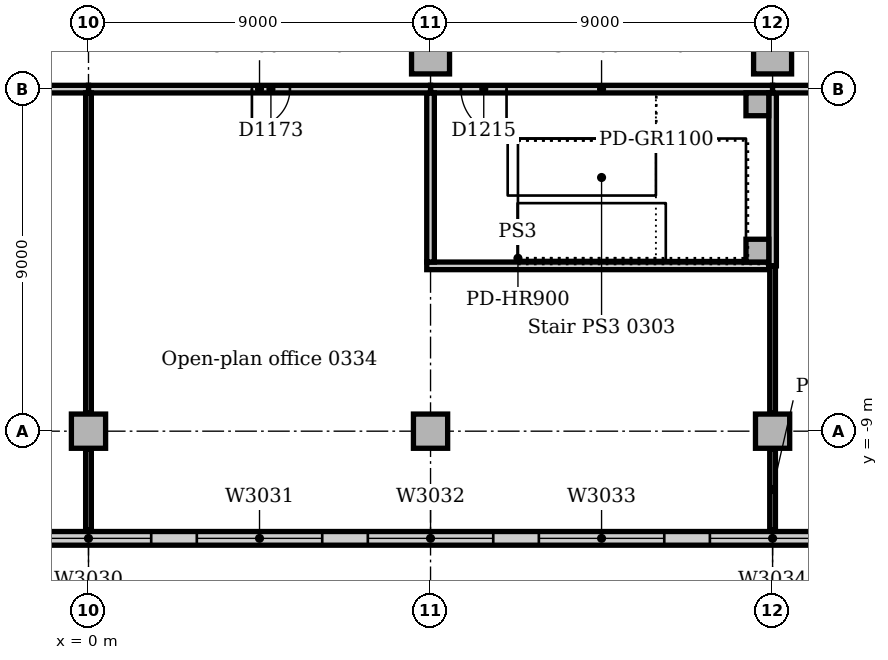
"""IFC4 building model, lengths in metres.
Left out: names, types, materials, properties, quantities, classifications, styles, units other than length and angle.
Written with IfcOpenShell. Run it as: python <this file> out.ifc"""

import sys

from ifc_helpers import new_model, si_unit, direction, frame, frame_2d, origin, origin_with_axes, origin_2d, place, context, subcontext, project, spatial, rectangle, extrude, element, fill, save


model = new_model("IFC4")
c1 = context("Model", 3, precision=1e-05, world=origin(), true_north=direction((0.0, 1.0)))
c2 = subcontext(c1, "Body", "Model", "MODEL_VIEW")
j1 = project(units=[si_unit("LENGTHUNIT", "METRE"), si_unit("PLANEANGLEUNIT", "RADIAN")], contexts=[c1])
p1 = place(None, origin())
s1 = spatial("IfcSite", under=j1, at=p1, CompositionType="ELEMENT")
p2 = place(p1, origin())
s2 = spatial("IfcBuilding", under=s1, at=p2, CompositionType="ELEMENT")
p3 = place(p2, frame((0.0, 0.0, 16.0)))
s3 = spatial("IfcBuildingStorey", under=s2, at=p3, CompositionType="ELEMENT", Elevation=16.0)
p4 = place(p3, frame((3.602, 1.453, 0.0), z_axis=(0.0, 0.0, 1.0), x_axis=(1.0, 0.0, 0.0)))
e1 = element("IfcColumn", 1, at=p4, inside=s3, PredefinedType="COLUMN", context=c2, shape_type="SweptSolid", body=[
    extrude(rectangle(XDim=1.2, YDim=1.2, at=origin_2d()), origin(), (0.0, 0.0, 1.0), 4.7),
])
for number, where, z_axis, x_axis in (
    (2, (9.0, 0.9, 0.0), (0.0, 0.0, 1.0), (1.0, 0.0, 0.0)),
    (3, (18.0, 0.9, 0.0), (0.0, 0.0, 1.0), (1.0, 0.0, 0.0)),
):
    element("IfcColumn", number, at=place(p3, frame(where, z_axis=z_axis, x_axis=x_axis)), inside=s3, PredefinedType="COLUMN", context=c2, shape_type="SweptSolid", body=[
        extrude(rectangle(XDim=1.0, YDim=1.0, at=origin_2d()), origin(), (0.0, 0.0, 1.0), 4.7),
    ])
for number, where, z_axis, x_axis in (
    (4, (0.0, -9.0, 0.0), (0.0, 0.0, 1.0), (1.0, 0.0, 0.0)),
    (5, (9.0, -9.0, 0.0), (0.0, 0.0, 1.0), (1.0, 0.0, 0.0)),
    (6, (18.0, -9.0, 0.0), (0.0, 0.0, 1.0), (1.0, 0.0, 0.0)),
):
    element("IfcColumn", number, at=place(p3, frame(where, z_axis=z_axis, x_axis=x_axis)), inside=s3, PredefinedType="COLUMN", context=c2, shape_type="SweptSolid", body=[
        extrude(rectangle(XDim=0.9, YDim=0.9, at=origin_2d()), origin(), (0.0, 0.0, 1.0), 4.7),
    ])
p5 = place(p3, frame((-81.0, -11.82, 0.0), z_axis=(0.0, 0.0, 1.0), x_axis=(1.0, 0.0, 0.0)))
e7 = element("IfcWall", 7, at=p5, inside=s3, PredefinedType="STANDARD", context=c2, shape_type="SweptSolid", body=[
    extrude(rectangle(XDim=144.0, YDim=0.36, at=frame_2d((72.0, 0.0))), origin(), (0.0, 0.0, 1.0), 4.7),
])
p6 = place(p5, frame((2.85, 0.0, 0.9)))
e8 = element("IfcOpeningElement", 8, at=p6, cuts=e7, PredefinedType="OPENING", context=c2, shape_type="SweptSolid", body=[
    extrude(rectangle(XDim=3.3, YDim=2.4, at=frame_2d((1.65, 1.2))), frame((0.0, 0.19, 0.0), z_axis=(0.0, -1.0, 0.0), x_axis=(1.0, 0.0, 0.0)), (0.0, 0.0, 1.0), 0.38),
])
p7 = place(p5, frame((7.35, 0.0, 0.9)))
e9 = element("IfcOpeningElement", 9, at=p7, cuts=e7, PredefinedType="OPENING", context=c2, shape_type="SweptSolid", body=[
    extrude(rectangle(XDim=3.3, YDim=2.4, at=frame_2d((1.65, 1.2))), frame((0.0, 0.19, 0.0), z_axis=(0.0, -1.0, 0.0), x_axis=(1.0, 0.0, 0.0)), (0.0, 0.0, 1.0), 0.38),
])
p8 = place(p5, frame((11.85, 0.0, 0.9)))
e10 = element("IfcOpeningElement", 10, at=p8, cuts=e7, PredefinedType="OPENING", context=c2, shape_type="SweptSolid", body=[
    extrude(rectangle(XDim=3.3, YDim=2.4, at=frame_2d((1.65, 1.2))), frame((0.0, 0.19, 0.0), z_axis=(0.0, -1.0, 0.0), x_axis=(1.0, 0.0, 0.0)), (0.0, 0.0, 1.0), 0.38),
])
p9 = place(p5, frame((16.35, 0.0, 0.9)))
e11 = element("IfcOpeningElement", 11, at=p9, cuts=e7, PredefinedType="OPENING", context=c2, shape_type="SweptSolid", body=[
    extrude(rectangle(XDim=3.3, YDim=2.4, at=frame_2d((1.65, 1.2))), frame((0.0, 0.19, 0.0), z_axis=(0.0, -1.0, 0.0), x_axis=(1.0, 0.0, 0.0)), (0.0, 0.0, 1.0), 0.38),
])
p10 = place(p5, frame((20.85, 0.0, 0.9)))
e12 = element("IfcOpeningElement", 12, at=p10, cuts=e7, PredefinedType="OPENING", context=c2, shape_type="SweptSolid", body=[
    extrude(rectangle(XDim=3.3, YDim=2.4, at=frame_2d((1.65, 1.2))), frame((0.0, 0.19, 0.0), z_axis=(0.0, -1.0, 0.0), x_axis=(1.0, 0.0, 0.0)), (0.0, 0.0, 1.0), 0.38),
])
p11 = place(p5, frame((25.35, 0.0, 0.9)))
e13 = element("IfcOpeningElement", 13, at=p11, cuts=e7, PredefinedType="OPENING", context=c2, shape_type="SweptSolid", body=[
    extrude(rectangle(XDim=3.3, YDim=2.4, at=frame_2d((1.65, 1.2))), frame((0.0, 0.19, 0.0), z_axis=(0.0, -1.0, 0.0), x_axis=(1.0, 0.0, 0.0)), (0.0, 0.0, 1.0), 0.38),
])
p12 = place(p5, frame((29.85, 0.0, 0.9)))
e14 = element("IfcOpeningElement", 14, at=p12, cuts=e7, PredefinedType="OPENING", context=c2, shape_type="SweptSolid", body=[
    extrude(rectangle(XDim=3.3, YDim=2.4, at=frame_2d((1.65, 1.2))), frame((0.0, 0.19, 0.0), z_axis=(0.0, -1.0, 0.0), x_axis=(1.0, 0.0, 0.0)), (0.0, 0.0, 1.0), 0.38),
])
p13 = place(p5, frame((34.35, 0.0, 0.9)))
e15 = element("IfcOpeningElement", 15, at=p13, cuts=e7, PredefinedType="OPENING", context=c2, shape_type="SweptSolid", body=[
    extrude(rectangle(XDim=3.3, YDim=2.4, at=frame_2d((1.65, 1.2))), frame((0.0, 0.19, 0.0), z_axis=(0.0, -1.0, 0.0), x_axis=(1.0, 0.0, 0.0)), (0.0, 0.0, 1.0), 0.38),
])
p14 = place(p5, frame((38.85, 0.0, 0.9)))
e16 = element("IfcOpeningElement", 16, at=p14, cuts=e7, PredefinedType="OPENING", context=c2, shape_type="SweptSolid", body=[
    extrude(rectangle(XDim=3.3, YDim=2.4, at=frame_2d((1.65, 1.2))), frame((0.0, 0.19, 0.0), z_axis=(0.0, -1.0, 0.0), x_axis=(1.0, 0.0, 0.0)), (0.0, 0.0, 1.0), 0.38),
])
p15 = place(p5, frame((43.35, 0.0, 0.9)))
e17 = element("IfcOpeningElement", 17, at=p15, cuts=e7, PredefinedType="OPENING", context=c2, shape_type="SweptSolid", body=[
    extrude(rectangle(XDim=3.3, YDim=2.4, at=frame_2d((1.65, 1.2))), frame((0.0, 0.19, 0.0), z_axis=(0.0, -1.0, 0.0), x_axis=(1.0, 0.0, 0.0)), (0.0, 0.0, 1.0), 0.38),
])
p16 = place(p5, frame((47.85, 0.0, 0.9)))
e18 = element("IfcOpeningElement", 18, at=p16, cuts=e7, PredefinedType="OPENING", context=c2, shape_type="SweptSolid", body=[
    extrude(rectangle(XDim=3.3, YDim=2.4, at=frame_2d((1.65, 1.2))), frame((0.0, 0.19, 0.0), z_axis=(0.0, -1.0, 0.0), x_axis=(1.0, 0.0, 0.0)), (0.0, 0.0, 1.0), 0.38),
])
p17 = place(p5, frame((52.35, 0.0, 0.9)))
e19 = element("IfcOpeningElement", 19, at=p17, cuts=e7, PredefinedType="OPENING", context=c2, shape_type="SweptSolid", body=[
    extrude(rectangle(XDim=3.3, YDim=2.4, at=frame_2d((1.65, 1.2))), frame((0.0, 0.19, 0.0), z_axis=(0.0, -1.0, 0.0), x_axis=(1.0, 0.0, 0.0)), (0.0, 0.0, 1.0), 0.38),
])
p18 = place(p5, frame((56.85, 0.0, 0.9)))
e20 = element("IfcOpeningElement", 20, at=p18, cuts=e7, PredefinedType="OPENING", context=c2, shape_type="SweptSolid", body=[
    extrude(rectangle(XDim=3.3, YDim=2.4, at=frame_2d((1.65, 1.2))), frame((0.0, 0.19, 0.0), z_axis=(0.0, -1.0, 0.0), x_axis=(1.0, 0.0, 0.0)), (0.0, 0.0, 1.0), 0.38),
])
p19 = place(p5, frame((61.35, 0.0, 0.9)))
e21 = element("IfcOpeningElement", 21, at=p19, cuts=e7, PredefinedType="OPENING", context=c2, shape_type="SweptSolid", body=[
    extrude(rectangle(XDim=3.3, YDim=2.4, at=frame_2d((1.65, 1.2))), frame((0.0, 0.19, 0.0), z_axis=(0.0, -1.0, 0.0), x_axis=(1.0, 0.0, 0.0)), (0.0, 0.0, 1.0), 0.38),
])
p20 = place(p5, frame((65.85, 0.0, 0.9)))
e22 = element("IfcOpeningElement", 22, at=p20, cuts=e7, PredefinedType="OPENING", context=c2, shape_type="SweptSolid", body=[
    extrude(rectangle(XDim=3.3, YDim=2.4, at=frame_2d((1.65, 1.2))), frame((0.0, 0.19, 0.0), z_axis=(0.0, -1.0, 0.0), x_axis=(1.0, 0.0, 0.0)), (0.0, 0.0, 1.0), 0.38),
])
p21 = place(p5, frame((70.35, 0.0, 0.9)))
e23 = element("IfcOpeningElement", 23, at=p21, cuts=e7, PredefinedType="OPENING", context=c2, shape_type="SweptSolid", body=[
    extrude(rectangle(XDim=3.3, YDim=2.4, at=frame_2d((1.65, 1.2))), frame((0.0, 0.19, 0.0), z_axis=(0.0, -1.0, 0.0), x_axis=(1.0, 0.0, 0.0)), (0.0, 0.0, 1.0), 0.38),
])
p22 = place(p5, frame((74.85, 0.0, 0.9)))
e24 = element("IfcOpeningElement", 24, at=p22, cuts=e7, PredefinedType="OPENING", context=c2, shape_type="SweptSolid", body=[
    extrude(rectangle(XDim=3.3, YDim=2.4, at=frame_2d((1.65, 1.2))), frame((0.0, 0.19, 0.0), z_axis=(0.0, -1.0, 0.0), x_axis=(1.0, 0.0, 0.0)), (0.0, 0.0, 1.0), 0.38),
])
p23 = place(p5, frame((79.35, 0.0, 0.9)))
e25 = element("IfcOpeningElement", 25, at=p23, cuts=e7, PredefinedType="OPENING", context=c2, shape_type="SweptSolid", body=[
    extrude(rectangle(XDim=3.3, YDim=2.4, at=frame_2d((1.65, 1.2))), frame((0.0, 0.19, 0.0), z_axis=(0.0, -1.0, 0.0), x_axis=(1.0, 0.0, 0.0)), (0.0, 0.0, 1.0), 0.38),
])
p24 = place(p5, frame((83.85, 0.0, 0.9)))
e26 = element("IfcOpeningElement", 26, at=p24, cuts=e7, PredefinedType="OPENING", context=c2, shape_type="SweptSolid", body=[
    extrude(rectangle(XDim=3.3, YDim=2.4, at=frame_2d((1.65, 1.2))), frame((0.0, 0.19, 0.0), z_axis=(0.0, -1.0, 0.0), x_axis=(1.0, 0.0, 0.0)), (0.0, 0.0, 1.0), 0.38),
])
p25 = place(p5, frame((88.35, 0.0, 0.9)))
e27 = element("IfcOpeningElement", 27, at=p25, cuts=e7, PredefinedType="OPENING", context=c2, shape_type="SweptSolid", body=[
    extrude(rectangle(XDim=3.3, YDim=2.4, at=frame_2d((1.65, 1.2))), frame((0.0, 0.19, 0.0), z_axis=(0.0, -1.0, 0.0), x_axis=(1.0, 0.0, 0.0)), (0.0, 0.0, 1.0), 0.38),
])
p26 = place(p5, frame((92.85, 0.0, 0.9)))
e28 = element("IfcOpeningElement", 28, at=p26, cuts=e7, PredefinedType="OPENING", context=c2, shape_type="SweptSolid", body=[
    extrude(rectangle(XDim=3.3, YDim=2.4, at=frame_2d((1.65, 1.2))), frame((0.0, 0.19, 0.0), z_axis=(0.0, -1.0, 0.0), x_axis=(1.0, 0.0, 0.0)), (0.0, 0.0, 1.0), 0.38),
])
p27 = place(p5, frame((97.35, 0.0, 0.9)))
e29 = element("IfcOpeningElement", 29, at=p27, cuts=e7, PredefinedType="OPENING", context=c2, shape_type="SweptSolid", body=[
    extrude(rectangle(XDim=3.3, YDim=2.4, at=frame_2d((1.65, 1.2))), frame((0.0, 0.19, 0.0), z_axis=(0.0, -1.0, 0.0), x_axis=(1.0, 0.0, 0.0)), (0.0, 0.0, 1.0), 0.38),
])
p28 = place(p5, frame((101.85, 0.0, 0.9)))
e30 = element("IfcOpeningElement", 30, at=p28, cuts=e7, PredefinedType="OPENING", context=c2, shape_type="SweptSolid", body=[
    extrude(rectangle(XDim=3.3, YDim=2.4, at=frame_2d((1.65, 1.2))), frame((0.0, 0.19, 0.0), z_axis=(0.0, -1.0, 0.0), x_axis=(1.0, 0.0, 0.0)), (0.0, 0.0, 1.0), 0.38),
])
p29 = place(p5, frame((106.35, 0.0, 0.9)))
e31 = element("IfcOpeningElement", 31, at=p29, cuts=e7, PredefinedType="OPENING", context=c2, shape_type="SweptSolid", body=[
    extrude(rectangle(XDim=3.3, YDim=2.4, at=frame_2d((1.65, 1.2))), frame((0.0, 0.19, 0.0), z_axis=(0.0, -1.0, 0.0), x_axis=(1.0, 0.0, 0.0)), (0.0, 0.0, 1.0), 0.38),
])
p30 = place(p5, frame((110.85, 0.0, 0.9)))
e32 = element("IfcOpeningElement", 32, at=p30, cuts=e7, PredefinedType="OPENING", context=c2, shape_type="SweptSolid", body=[
    extrude(rectangle(XDim=3.3, YDim=2.4, at=frame_2d((1.65, 1.2))), frame((0.0, 0.19, 0.0), z_axis=(0.0, -1.0, 0.0), x_axis=(1.0, 0.0, 0.0)), (0.0, 0.0, 1.0), 0.38),
])
p31 = place(p5, frame((115.35, 0.0, 0.9)))
e33 = element("IfcOpeningElement", 33, at=p31, cuts=e7, PredefinedType="OPENING", context=c2, shape_type="SweptSolid", body=[
    extrude(rectangle(XDim=3.3, YDim=2.4, at=frame_2d((1.65, 1.2))), frame((0.0, 0.19, 0.0), z_axis=(0.0, -1.0, 0.0), x_axis=(1.0, 0.0, 0.0)), (0.0, 0.0, 1.0), 0.38),
])
p32 = place(p5, frame((119.85, 0.0, 0.9)))
e34 = element("IfcOpeningElement", 34, at=p32, cuts=e7, PredefinedType="OPENING", context=c2, shape_type="SweptSolid", body=[
    extrude(rectangle(XDim=3.3, YDim=2.4, at=frame_2d((1.65, 1.2))), frame((0.0, 0.19, 0.0), z_axis=(0.0, -1.0, 0.0), x_axis=(1.0, 0.0, 0.0)), (0.0, 0.0, 1.0), 0.38),
])
p33 = place(p5, frame((124.35, 0.0, 0.9)))
e35 = element("IfcOpeningElement", 35, at=p33, cuts=e7, PredefinedType="OPENING", context=c2, shape_type="SweptSolid", body=[
    extrude(rectangle(XDim=3.3, YDim=2.4, at=frame_2d((1.65, 1.2))), frame((0.0, 0.19, 0.0), z_axis=(0.0, -1.0, 0.0), x_axis=(1.0, 0.0, 0.0)), (0.0, 0.0, 1.0), 0.38),
])
p34 = place(p5, frame((128.85, 0.0, 0.9)))
e36 = element("IfcOpeningElement", 36, at=p34, cuts=e7, PredefinedType="OPENING", context=c2, shape_type="SweptSolid", body=[
    extrude(rectangle(XDim=3.3, YDim=2.4, at=frame_2d((1.65, 1.2))), frame((0.0, 0.19, 0.0), z_axis=(0.0, -1.0, 0.0), x_axis=(1.0, 0.0, 0.0)), (0.0, 0.0, 1.0), 0.38),
])
p35 = place(p5, frame((133.35, 0.0, 0.9)))
e37 = element("IfcOpeningElement", 37, at=p35, cuts=e7, PredefinedType="OPENING", context=c2, shape_type="SweptSolid", body=[
    extrude(rectangle(XDim=3.3, YDim=2.4, at=frame_2d((1.65, 1.2))), frame((0.0, 0.19, 0.0), z_axis=(0.0, -1.0, 0.0), x_axis=(1.0, 0.0, 0.0)), (0.0, 0.0, 1.0), 0.38),
])
p36 = place(p5, frame((137.85, 0.0, 0.9)))
e38 = element("IfcOpeningElement", 38, at=p36, cuts=e7, PredefinedType="OPENING", context=c2, shape_type="SweptSolid", body=[
    extrude(rectangle(XDim=3.3, YDim=2.4, at=frame_2d((1.65, 1.2))), frame((0.0, 0.19, 0.0), z_axis=(0.0, -1.0, 0.0), x_axis=(1.0, 0.0, 0.0)), (0.0, 0.0, 1.0), 0.38),
])
for number, where, z_axis, x_axis in (
    (39, (17.6, -4.25, 0.0), (0.0, 0.0, 1.0), (1.0, 0.0, 0.0)),
    (40, (17.6, -0.4, 0.0), (0.0, 0.0, 1.0), (1.0, 0.0, 0.0)),
):
    element("IfcColumn", number, at=place(p3, frame(where, z_axis=z_axis, x_axis=x_axis)), inside=s3, PredefinedType="COLUMN", context=c2, shape_type="SweptSolid", body=[
        extrude(rectangle(XDim=0.6, YDim=0.6, at=origin_2d()), origin(), (0.0, 0.0, 1.0), 5.0),
    ])
p37 = place(p3, frame((9.0, 0.0, 0.0), z_axis=(0.0, 0.0, 1.0), x_axis=(1.0, 0.0, 0.0)))
e41 = element("IfcWall", 41, at=p37, inside=s3, PredefinedType="SOLIDWALL", context=c2, shape_type="SweptSolid", body=[
    extrude(rectangle(XDim=9.0, YDim=0.2, at=frame_2d((4.5, 0.0))), origin(), (0.0, 0.0, 1.0), 4.7),
])
p38 = place(p37, frame((0.8, 0.0, 0.0)))
e42 = element("IfcOpeningElement", 42, at=p38, cuts=e41, PredefinedType="OPENING", context=c2, shape_type="SweptSolid", body=[
    extrude(rectangle(XDim=1.2, YDim=2.1, at=frame_2d((0.6, 1.05))), frame((0.0, 0.11, 0.0), z_axis=(0.0, -1.0, 0.0), x_axis=(1.0, 0.0, 0.0)), (0.0, 0.0, 1.0), 0.22),
])
p39 = place(p3, frame((8.9, -4.65, 0.0), z_axis=(0.0, 0.0, 1.0), x_axis=(1.0, 0.0, 0.0)))
e43 = element("IfcWall", 43, at=p39, inside=s3, PredefinedType="SOLIDWALL", context=c2, shape_type="SweptSolid", body=[
    extrude(rectangle(XDim=9.0, YDim=0.2, at=frame_2d((4.5, 0.0))), origin(), (0.0, 0.0, 1.0), 4.7),
])
p40 = place(p3, frame((9.0, -4.55, 0.0), z_axis=(0.0, 0.0, 1.0), x_axis=(0.0, 1.0, 0.0)))
e44 = element("IfcWall", 44, at=p40, inside=s3, PredefinedType="SOLIDWALL", context=c2, shape_type="SweptSolid", body=[
    extrude(rectangle(XDim=4.45, YDim=0.2, at=frame_2d((2.225, 0.0))), origin(), (0.0, 0.0, 1.0), 4.7),
])
p41 = place(p3, frame((18.0, -4.65, 0.0), z_axis=(0.0, 0.0, 1.0), x_axis=(0.0, 1.0, 0.0)))
e45 = element("IfcWall", 45, at=p41, inside=s3, PredefinedType="SOLIDWALL", context=c2, shape_type="SweptSolid", body=[
    extrude(rectangle(XDim=4.55, YDim=0.2, at=frame_2d((2.275, 0.0))), origin(), (0.0, 0.0, 1.0), 4.7),
])
p42 = place(p3, origin_with_axes())
e46 = element("IfcWall", 46, at=p42, inside=s3, PredefinedType="PARTITIONING", context=c2, shape_type="SweptSolid", body=[
    extrude(rectangle(XDim=9.0, YDim=0.2, at=frame_2d((4.5, 0.0))), origin(), (0.0, 0.0, 1.0), 4.7),
])
p43 = place(p42, frame((4.3, 0.0, 0.0)))
e47 = element("IfcOpeningElement", 47, at=p43, cuts=e46, PredefinedType="OPENING", context=c2, shape_type="SweptSolid", body=[
    extrude(rectangle(XDim=1.0, YDim=2.1, at=frame_2d((0.5, 1.05))), frame((0.0, 0.11, 0.0), z_axis=(0.0, -1.0, 0.0), x_axis=(1.0, 0.0, 0.0)), (0.0, 0.0, 1.0), 0.22),
])
p44 = place(p3, frame((18.0, 0.0, 0.0), z_axis=(0.0, 0.0, 1.0), x_axis=(1.0, 0.0, 0.0)))
e48 = element("IfcWall", 48, at=p44, inside=s3, PredefinedType="PARTITIONING", context=c2, shape_type="SweptSolid", body=[
    extrude(rectangle(XDim=9.0, YDim=0.2, at=frame_2d((4.5, 0.0))), origin(), (0.0, 0.0, 1.0), 4.7),
])
p45 = place(p44, frame((4.0, 0.0, 0.0)))
e49 = element("IfcOpeningElement", 49, at=p45, cuts=e48, PredefinedType="OPENING", context=c2, shape_type="SweptSolid", body=[
    extrude(rectangle(XDim=1.0, YDim=2.1, at=frame_2d((0.5, 1.05))), frame((0.0, 0.11, 0.0), z_axis=(0.0, -1.0, 0.0), x_axis=(1.0, 0.0, 0.0)), (0.0, 0.0, 1.0), 0.22),
])
p46 = place(p3, frame((-8.53, 0.0, 0.0), z_axis=(0.0, 0.0, 1.0), x_axis=(1.0, 0.0, 0.0)))
e50 = element("IfcWall", 50, at=p46, inside=s3, PredefinedType="PARTITIONING", context=c2, shape_type="SweptSolid", body=[
    extrude(rectangle(XDim=8.53, YDim=0.2, at=frame_2d((4.265, 0.0))), origin(), (0.0, 0.0, 1.0), 4.7),
])
p47 = place(p46, frame((3.53, 0.0, 0.0)))
e51 = element("IfcOpeningElement", 51, at=p47, cuts=e50, PredefinedType="OPENING", context=c2, shape_type="SweptSolid", body=[
    extrude(rectangle(XDim=1.0, YDim=2.1, at=frame_2d((0.5, 1.05))), frame((0.0, 0.11, 0.0), z_axis=(0.0, -1.0, 0.0), x_axis=(1.0, 0.0, 0.0)), (0.0, 0.0, 1.0), 0.22),
])
p48 = place(p3, frame((0.0, -11.6, 0.0), z_axis=(0.0, 0.0, 1.0), x_axis=(0.0, 1.0, 0.0)))
e52 = element("IfcWall", 52, at=p48, inside=s3, PredefinedType="PARTITIONING", context=c2, shape_type="SweptSolid", body=[
    extrude(rectangle(XDim=2.13, YDim=0.15, at=frame_2d((1.065, 0.0))), origin(), (0.0, 0.0, 1.0), 4.7),
])
p49 = place(p3, frame((0.0, -8.53, 0.0), z_axis=(0.0, 0.0, 1.0), x_axis=(0.0, 1.0, 0.0)))
e53 = element("IfcWall", 53, at=p49, inside=s3, PredefinedType="PARTITIONING", context=c2, shape_type="SweptSolid", body=[
    extrude(rectangle(XDim=8.43, YDim=0.15, at=frame_2d((4.215, 0.0))), origin(), (0.0, 0.0, 1.0), 4.7),
])
p50 = place(p3, frame((18.0, -11.6, 0.0), z_axis=(0.0, 0.0, 1.0), x_axis=(0.0, 1.0, 0.0)))
e54 = element("IfcWall", 54, at=p50, inside=s3, PredefinedType="PARTITIONING", context=c2, shape_type="SweptSolid", body=[
    extrude(rectangle(XDim=2.13, YDim=0.15, at=frame_2d((1.065, 0.0))), origin(), (0.0, 0.0, 1.0), 4.7),
])
p51 = place(p3, frame((18.0, -8.53, 0.0), z_axis=(0.0, 0.0, 1.0), x_axis=(0.0, 1.0, 0.0)))
e55 = element("IfcWall", 55, at=p51, inside=s3, PredefinedType="PARTITIONING", context=c2, shape_type="SweptSolid", body=[
    extrude(rectangle(XDim=3.88, YDim=0.15, at=frame_2d((1.94, 0.0))), origin(), (0.0, 0.0, 1.0), 4.7),
])
p52 = place(p23, origin())
e56 = element("IfcWindow", 56, at=p52, inside=s3, PartitioningType="SINGLE_PANEL", PredefinedType="WINDOW", context=c2, shape_type="SweptSolid", body=[
    extrude(rectangle(XDim=3.3, YDim=2.4, at=frame_2d((1.65, 1.2))), frame((0.0, 0.13, 0.0), z_axis=(0.0, -1.0, 0.0), x_axis=(1.0, 0.0, 0.0)), (0.0, 0.0, 1.0), 0.06),
])
fill(e25, e56)
p53 = place(p24, origin())
e57 = element("IfcWindow", 57, at=p53, inside=s3, PartitioningType="SINGLE_PANEL", PredefinedType="WINDOW", context=c2, shape_type="SweptSolid", body=[
    extrude(rectangle(XDim=3.3, YDim=2.4, at=frame_2d((1.65, 1.2))), frame((0.0, 0.13, 0.0), z_axis=(0.0, -1.0, 0.0), x_axis=(1.0, 0.0, 0.0)), (0.0, 0.0, 1.0), 0.06),
])
fill(e26, e57)
p54 = place(p25, origin())
e58 = element("IfcWindow", 58, at=p54, inside=s3, PartitioningType="SINGLE_PANEL", PredefinedType="WINDOW", context=c2, shape_type="SweptSolid", body=[
    extrude(rectangle(XDim=3.3, YDim=2.4, at=frame_2d((1.65, 1.2))), frame((0.0, 0.13, 0.0), z_axis=(0.0, -1.0, 0.0), x_axis=(1.0, 0.0, 0.0)), (0.0, 0.0, 1.0), 0.06),
])
fill(e27, e58)
p55 = place(p26, origin())
e59 = element("IfcWindow", 59, at=p55, inside=s3, PartitioningType="SINGLE_PANEL", PredefinedType="WINDOW", context=c2, shape_type="SweptSolid", body=[
    extrude(rectangle(XDim=3.3, YDim=2.4, at=frame_2d((1.65, 1.2))), frame((0.0, 0.13, 0.0), z_axis=(0.0, -1.0, 0.0), x_axis=(1.0, 0.0, 0.0)), (0.0, 0.0, 1.0), 0.06),
])
fill(e28, e59)
p56 = place(p27, origin())
e60 = element("IfcWindow", 60, at=p56, inside=s3, PartitioningType="SINGLE_PANEL", PredefinedType="WINDOW", context=c2, shape_type="SweptSolid", body=[
    extrude(rectangle(XDim=3.3, YDim=2.4, at=frame_2d((1.65, 1.2))), frame((0.0, 0.13, 0.0), z_axis=(0.0, -1.0, 0.0), x_axis=(1.0, 0.0, 0.0)), (0.0, 0.0, 1.0), 0.06),
])
fill(e29, e60)
p57 = place(p43, frame((1.0, 0.0, 0.0), z_axis=(0.0, 0.0, 1.0), x_axis=(-1.0, 0.0, 0.0)))
e61 = element("IfcDoor", 61, at=p57, inside=s3, OperationType="SINGLE_SWING_RIGHT", PredefinedType="DOOR", context=c2, shape_type="SweptSolid", body=[
    extrude(rectangle(XDim=1.0, YDim=2.1, at=frame_2d((0.5, 1.05))), frame((0.0, 0.025, 0.0), z_axis=(0.0, -1.0, 0.0), x_axis=(1.0, 0.0, 0.0)), (0.0, 0.0, 1.0), 0.05),
])
fill(e47, e61)
p58 = place(p38, frame((1.2, 0.0, 0.0), z_axis=(0.0, 0.0, 1.0), x_axis=(-1.0, 0.0, 0.0)))
e62 = element("IfcDoor", 62, at=p58, inside=s3, OperationType="SINGLE_SWING_LEFT", PredefinedType="DOOR", context=c2, shape_type="SweptSolid", body=[
    extrude(rectangle(XDim=1.2, YDim=2.1, at=frame_2d((0.6, 1.05))), frame((0.0, 0.025, 0.0), z_axis=(0.0, -1.0, 0.0), x_axis=(1.0, 0.0, 0.0)), (0.0, 0.0, 1.0), 0.05),
])
fill(e42, e62)
save(model, sys.argv[1])
